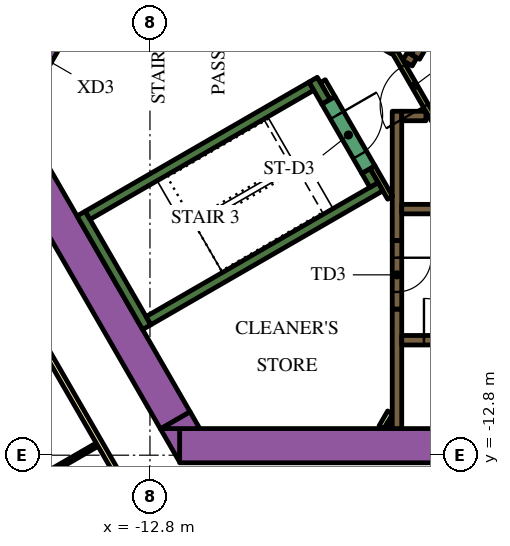
"""IFC4 building model, lengths in metres.
Left out: names, types, materials, properties, quantities, classifications, styles, units other than length and angle.
Written with IfcOpenShell. Run it as: python <this file> out.ifc"""

import sys

from ifc_helpers import new_model, si_unit, direction, frame, frame_2d, origin, place, context, subcontext, project, spatial, polyline, rectangle, outline, extrude, element, fill, save


model = new_model("IFC4")
c1 = context("Model", 3, precision=1e-05, world=origin(), true_north=direction((0.0, 1.0)))
c2 = subcontext(c1, "Body", "Model", "MODEL_VIEW")
j1 = project(units=[si_unit("LENGTHUNIT", "METRE"), si_unit("PLANEANGLEUNIT", "RADIAN")], contexts=[c1])
p1 = place(None, origin())
s1 = spatial("IfcSite", under=j1, at=p1, CompositionType="ELEMENT")
p2 = place(p1, origin())
s2 = spatial("IfcBuilding", under=s1, at=p2, CompositionType="ELEMENT")
p3 = place(p2, frame((0.0, 0.0, 118.8)))
s3 = spatial("IfcBuildingStorey", under=s2, at=p3, CompositionType="ELEMENT", Elevation=118.8)
p4 = place(p3, frame((-12.019, -12.55, 0.0), z_axis=(0.0, 0.0, 1.0), x_axis=(1.0, 0.0, 0.0)))
e1 = element("IfcWall", 1, at=p4, inside=s3, PredefinedType="SOLIDWALL", context=c2, shape_type="SweptSolid", body=[
    extrude(rectangle(XDim=22.083, YDim=0.9, at=frame_2d((11.042, 0.0))), origin(), (0.0, 0.0, 1.0), 3.9),
])
p5 = place(p3, origin())
e2 = element("IfcWall", 2, at=p5, inside=s3, PredefinedType="SOLIDWALL", context=c2, shape_type="SweptSolid", body=[
    extrude(outline(polyline([(-12.529, -12.1), (-12.021, -12.1), (-12.021, -12.98), (-12.529, -12.1)])), origin(), (0.0, 0.0, 1.0), 3.9),
])
p6 = place(p3, frame((-12.134, -11.883, 0.0), z_axis=(0.0, 0.0, 1.0), x_axis=(-0.500005339912, 0.866022320763, 0.0)))
e3 = element("IfcWall", 3, at=p6, inside=s3, PredefinedType="SOLIDWALL", context=c2, shape_type="SweptSolid", body=[
    extrude(rectangle(XDim=9.488, YDim=0.9, at=frame_2d((4.744, 0.0))), origin(), (0.0, 0.0, 1.0), 3.9),
])
e4 = element("IfcWall", 4, at=p5, inside=s3, PredefinedType="SOLIDWALL", context=c2, shape_type="SweptSolid", body=[
    extrude(outline(polyline([(-11.489, -12.1), (-12.505, -12.1), (-11.743, -11.66), (-11.489, -12.1)])), origin(), (0.0, 0.0, 1.0), 3.9),
])
p7 = place(p3, frame((-12.885, -9.431, 0.0), z_axis=(0.0, 0.0, 1.0), x_axis=(-0.500020560727, 0.866013532718, 0.0)))
e5 = element("IfcWall", 5, at=p7, inside=s3, PredefinedType="SOLIDWALL", context=c2, shape_type="SweptSolid", body=[
    extrude(rectangle(XDim=3.45, YDim=0.25, at=frame_2d((1.725, 0.0))), origin(), (0.0, 0.0, 1.0), 3.9),
])
p8 = place(p3, frame((-14.44, -6.49, 0.0), z_axis=(0.0, 0.0, 1.0), x_axis=(0.866022966069, 0.500004222222, 0.0)))
e6 = element("IfcWall", 6, at=p8, inside=s3, PredefinedType="SOLIDWALL", context=c2, shape_type="SweptSolid", body=[
    extrude(rectangle(XDim=6.8, YDim=0.25, at=frame_2d((3.4, 0.0))), origin(), (0.0, 0.0, 1.0), 3.9),
])
p9 = place(p3, frame((-8.168, -3.503, 0.0), z_axis=(0.0, 0.0, 1.0), x_axis=(-0.499952099219, 0.866053057547, 0.0)))
e7 = element("IfcWall", 7, at=p9, inside=s3, PredefinedType="SOLIDWALL", context=c2, shape_type="SweptSolid", body=[
    extrude(rectangle(XDim=0.675, YDim=0.25, at=frame_2d((0.337, 0.0))), origin(), (0.0, 0.0, 1.0), 3.9),
])
p10 = place(p3, frame((-12.84, -9.261, 0.0), z_axis=(0.0, 0.0, 1.0), x_axis=(0.866016039709, 0.500016218704, 0.0)))
e8 = element("IfcWall", 8, at=p10, inside=s3, PredefinedType="SOLIDWALL", context=c2, shape_type="SweptSolid", body=[
    extrude(rectangle(XDim=7.05, YDim=0.25, at=frame_2d((3.525, 0.0))), origin(), (0.0, 0.0, 1.0), 3.9),
])
p11 = place(p3, frame((-6.905, -5.69, 0.0), z_axis=(0.0, 0.0, 1.0), x_axis=(-0.500402024738, 0.865793170242, 0.0)))
e9 = element("IfcWall", 9, at=p11, inside=s3, PredefinedType="SOLIDWALL", context=c2, shape_type="SweptSolid", body=[
    extrude(rectangle(XDim=0.425, YDim=0.25, at=frame_2d((0.212, 0.0))), origin(), (0.0, 0.0, 1.0), 3.9),
])
p12 = place(p3, frame((-6.3, -12.1, 0.0), z_axis=(0.0, 0.0, 1.0), x_axis=(0.0, 1.0, 0.0)))
e10 = element("IfcWall", 10, at=p12, inside=s3, PredefinedType="SOLIDWALL", context=c2, shape_type="SweptSolid", body=[
    extrude(rectangle(XDim=3.146, YDim=0.25, at=frame_2d((1.573, 0.0))), origin(), (0.0, 0.0, 1.0), 3.9),
])
p13 = place(p3, frame((-6.3, -3.75, 0.0), z_axis=(0.0, 0.0, 1.0), x_axis=(0.0, -1.0, 0.0)))
e11 = element("IfcWall", 11, at=p13, inside=s3, PredefinedType="SOLIDWALL", context=c2, shape_type="SweptSolid", body=[
    extrude(rectangle(XDim=3.404, YDim=0.25, at=frame_2d((1.702, 0.0))), origin(), (0.0, 0.0, 1.0), 3.9),
])
p14 = place(p3, frame((-6.175, -3.875, 0.0), z_axis=(0.0, 0.0, 1.0), x_axis=(1.0, 0.0, 0.0)))
e12 = element("IfcWall", 12, at=p14, inside=s3, PredefinedType="SOLIDWALL", context=c2, shape_type="SweptSolid", body=[
    extrude(rectangle(XDim=0.637, YDim=0.25, at=frame_2d((0.318, 0.0))), origin(), (0.0, 0.0, 1.0), 3.9),
])
p15 = place(p3, frame((-6.088, -2.305, 0.0), z_axis=(0.0, 0.0, 1.0), x_axis=(0.866059450854, -0.499941024108, 0.0)))
e13 = element("IfcWall", 13, at=p15, inside=s3, PredefinedType="SOLIDWALL", context=c2, shape_type="SweptSolid", body=[
    extrude(rectangle(XDim=0.29, YDim=0.25, at=frame_2d((0.145, 0.0))), origin(), (0.0, 0.0, 1.0), 3.9),
])
p16 = place(p3, frame((-7.889, -1.265, 0.0), z_axis=(0.0, 0.0, 1.0), x_axis=(0.865986741702, -0.500066958712, 0.0)))
e14 = element("IfcWall", 14, at=p16, inside=s3, PredefinedType="SOLIDWALL", context=c2, shape_type="SweptSolid", body=[
    extrude(rectangle(XDim=1.738, YDim=0.25, at=frame_2d((0.869, 0.0))), origin(), (0.0, 0.0, 1.0), 3.9),
])
p17 = place(p3, frame((-6.708, -12.068, 0.0), z_axis=(0.0, 0.0, 1.0), x_axis=(0.500000789788, 0.8660249478, 0.0)))
e15 = element("IfcWall", 15, at=p17, inside=s3, PredefinedType="PARTITIONING", context=c2, shape_type="SweptSolid", body=[
    extrude(rectangle(XDim=0.456, YDim=0.15, at=frame_2d((0.228, 0.0))), origin(), (0.0, 0.0, 1.0), 2.75),
])
p18 = place(p3, frame((-6.534, -12.068, 0.0), z_axis=(0.0, 0.0, 1.0), x_axis=(0.500240224089, 0.865886665912, 0.0)))
e16 = element("IfcWall", 16, at=p18, inside=s3, PredefinedType="PARTITIONING", context=c2, shape_type="SweptSolid", body=[
    extrude(rectangle(XDim=0.109, YDim=0.15, at=frame_2d((0.054, 0.0))), origin(), (0.0, 0.0, 1.0), 2.75),
])
p19 = place(p3, frame((-6.48, -6.027, 0.0), z_axis=(0.0, 0.0, 1.0), x_axis=(-0.499927229454, 0.866067413802, 0.0)))
e17 = element("IfcWall", 17, at=p19, inside=s3, PredefinedType="PARTITIONING", context=c2, shape_type="SweptSolid", body=[
    extrude(rectangle(XDim=0.929, YDim=0.15, at=frame_2d((0.464, 0.0))), origin(), (0.0, 0.0, 1.0), 3.9),
])
p20 = place(p3, frame((-8.252, -2.958, 0.0), z_axis=(0.0, 0.0, 1.0), x_axis=(0.500174715838, -0.865924508047, 0.0)))
e18 = element("IfcWall", 18, at=p20, inside=s3, PredefinedType="PARTITIONING", context=c2, shape_type="SweptSolid", body=[
    extrude(rectangle(XDim=0.514, YDim=0.15, at=frame_2d((0.257, 0.0))), origin(), (0.0, 0.0, 1.0), 2.75),
])
p21 = place(p3, frame((-6.175, -9.775, 0.0), z_axis=(0.0, 0.0, 1.0), x_axis=(1.0, 0.0, 0.0)))
e19 = element("IfcWall", 19, at=p21, inside=s3, PredefinedType="SOLIDWALL", context=c2, shape_type="SweptSolid", body=[
    extrude(rectangle(XDim=12.35, YDim=0.25, at=frame_2d((6.175, 0.0))), origin(), (0.0, 0.0, 1.0), 3.9),
])
p22 = place(p21, frame((0.585, 0.0, 0.0)))
e20 = element("IfcOpeningElement", 20, at=p22, cuts=e19, PredefinedType="OPENING", context=c2, shape_type="SweptSolid", body=[
    extrude(rectangle(XDim=1.1, YDim=2.1, at=frame_2d((0.55, 1.05))), frame((0.0, 0.135, 0.0), z_axis=(0.0, -1.0, 0.0), x_axis=(1.0, 0.0, 0.0)), (0.0, 0.0, 1.0), 0.27),
])
p23 = place(p21, frame((3.105, 0.0, 0.0)))
e21 = element("IfcOpeningElement", 21, at=p23, cuts=e19, PredefinedType="OPENING", context=c2, shape_type="SweptSolid", body=[
    extrude(rectangle(XDim=1.1, YDim=2.1, at=frame_2d((0.55, 1.05))), frame((0.0, 0.135, 0.0), z_axis=(0.0, -1.0, 0.0), x_axis=(1.0, 0.0, 0.0)), (0.0, 0.0, 1.0), 0.27),
])
p24 = place(p21, frame((5.625, 0.0, 0.0)))
e22 = element("IfcOpeningElement", 22, at=p24, cuts=e19, PredefinedType="OPENING", context=c2, shape_type="SweptSolid", body=[
    extrude(rectangle(XDim=1.1, YDim=2.1, at=frame_2d((0.55, 1.05))), frame((0.0, 0.135, 0.0), z_axis=(0.0, -1.0, 0.0), x_axis=(1.0, 0.0, 0.0)), (0.0, 0.0, 1.0), 0.27),
])
p25 = place(p21, frame((8.145, 0.0, 0.0)))
e23 = element("IfcOpeningElement", 23, at=p25, cuts=e19, PredefinedType="OPENING", context=c2, shape_type="SweptSolid", body=[
    extrude(rectangle(XDim=1.1, YDim=2.1, at=frame_2d((0.55, 1.05))), frame((0.0, 0.135, 0.0), z_axis=(0.0, -1.0, 0.0), x_axis=(1.0, 0.0, 0.0)), (0.0, 0.0, 1.0), 0.27),
])
p26 = place(p21, frame((10.665, 0.0, 0.0)))
e24 = element("IfcOpeningElement", 24, at=p26, cuts=e19, PredefinedType="OPENING", context=c2, shape_type="SweptSolid", body=[
    extrude(rectangle(XDim=1.1, YDim=2.1, at=frame_2d((0.55, 1.05))), frame((0.0, 0.135, 0.0), z_axis=(0.0, -1.0, 0.0), x_axis=(1.0, 0.0, 0.0)), (0.0, 0.0, 1.0), 0.27),
])
p27 = place(p3, frame((-6.175, -6.325, 0.0), z_axis=(0.0, 0.0, 1.0), x_axis=(1.0, 0.0, 0.0)))
e25 = element("IfcWall", 25, at=p27, inside=s3, PredefinedType="SOLIDWALL", context=c2, shape_type="SweptSolid", body=[
    extrude(rectangle(XDim=12.35, YDim=0.25, at=frame_2d((6.175, 0.0))), origin(), (0.0, 0.0, 1.0), 3.9),
])
p28 = place(p27, frame((3.205, 0.0, 0.0)))
e26 = element("IfcOpeningElement", 26, at=p28, cuts=e25, PredefinedType="OPENING", context=c2, shape_type="SweptSolid", body=[
    extrude(rectangle(XDim=0.9, YDim=2.1, at=frame_2d((0.45, 1.05))), frame((0.0, 0.135, 0.0), z_axis=(0.0, -1.0, 0.0), x_axis=(1.0, 0.0, 0.0)), (0.0, 0.0, 1.0), 0.27),
])
p29 = place(p27, frame((8.145, 0.0, 0.0)))
e27 = element("IfcOpeningElement", 27, at=p29, cuts=e25, PredefinedType="OPENING", context=c2, shape_type="SweptSolid", body=[
    extrude(rectangle(XDim=1.1, YDim=2.1, at=frame_2d((0.55, 1.05))), frame((0.0, 0.135, 0.0), z_axis=(0.0, -1.0, 0.0), x_axis=(1.0, 0.0, 0.0)), (0.0, 0.0, 1.0), 0.27),
])
p30 = place(p27, frame((10.665, 0.0, 0.0)))
e28 = element("IfcOpeningElement", 28, at=p30, cuts=e25, PredefinedType="OPENING", context=c2, shape_type="SweptSolid", body=[
    extrude(rectangle(XDim=1.1, YDim=2.1, at=frame_2d((0.55, 1.05))), frame((0.0, 0.135, 0.0), z_axis=(0.0, -1.0, 0.0), x_axis=(1.0, 0.0, 0.0)), (0.0, 0.0, 1.0), 0.27),
])
p31 = place(p3, frame((-0.898, 6.194, 0.0), z_axis=(0.0, 0.0, 1.0), x_axis=(-0.499996202215, -0.866027596426, 0.0)))
e29 = element("IfcWall", 29, at=p31, inside=s3, PredefinedType="SOLIDWALL", context=c2, shape_type="SweptSolid", body=[
    extrude(rectangle(XDim=9.83, YDim=0.25, at=frame_2d((4.915, 0.0))), origin(), (0.0, 0.0, 1.0), 3.9),
])
p32 = place(p31, frame((0.585, 0.0, 0.0)))
e30 = element("IfcOpeningElement", 30, at=p32, cuts=e29, PredefinedType="OPENING", context=c2, shape_type="SweptSolid", body=[
    extrude(rectangle(XDim=1.1, YDim=2.1, at=frame_2d((0.55, 1.05))), frame((0.0, 0.135, 0.0), z_axis=(0.0, -1.0, 0.0), x_axis=(1.0, 0.0, 0.0)), (0.0, 0.0, 1.0), 0.27),
])
p33 = place(p31, frame((3.105, 0.0, 0.0)))
e31 = element("IfcOpeningElement", 31, at=p33, cuts=e29, PredefinedType="OPENING", context=c2, shape_type="SweptSolid", body=[
    extrude(rectangle(XDim=1.1, YDim=2.1, at=frame_2d((0.55, 1.05))), frame((0.0, 0.135, 0.0), z_axis=(0.0, -1.0, 0.0), x_axis=(1.0, 0.0, 0.0)), (0.0, 0.0, 1.0), 0.27),
])
p34 = place(p31, frame((5.625, 0.0, 0.0)))
e32 = element("IfcOpeningElement", 32, at=p34, cuts=e29, PredefinedType="OPENING", context=c2, shape_type="SweptSolid", body=[
    extrude(rectangle(XDim=1.1, YDim=2.1, at=frame_2d((0.55, 1.05))), frame((0.0, 0.135, 0.0), z_axis=(0.0, -1.0, 0.0), x_axis=(1.0, 0.0, 0.0)), (0.0, 0.0, 1.0), 0.27),
])
p35 = place(p31, frame((8.145, 0.0, 0.0)))
e33 = element("IfcOpeningElement", 33, at=p35, cuts=e29, PredefinedType="OPENING", context=c2, shape_type="SweptSolid", body=[
    extrude(rectangle(XDim=1.1, YDim=2.1, at=frame_2d((0.55, 1.05))), frame((0.0, 0.135, 0.0), z_axis=(0.0, -1.0, 0.0), x_axis=(1.0, 0.0, 0.0)), (0.0, 0.0, 1.0), 0.27),
])
p36 = place(p3, frame((-8.103, -3.466, 0.0), z_axis=(0.0, 0.0, 1.0), x_axis=(0.500078061341, -0.865980330357, 0.0)))
e34 = element("IfcWall", 34, at=p36, inside=s3, PredefinedType="SOLIDWALL", context=c2, shape_type="SweptSolid", body=[
    extrude(rectangle(XDim=2.1, YDim=0.4, at=frame_2d((1.05, 0.0))), origin(), (0.0, 0.0, 1.0), 3.9),
])
p37 = place(p36, frame((0.45, 0.0, 0.0)))
e35 = element("IfcOpeningElement", 35, at=p37, cuts=e34, PredefinedType="OPENING", context=c2, shape_type="SweptSolid", body=[
    extrude(rectangle(XDim=1.2, YDim=2.1, at=frame_2d((0.6, 1.05))), frame((0.0, 0.21, 0.0), z_axis=(0.0, -1.0, 0.0), x_axis=(1.0, 0.0, 0.0)), (0.0, 0.0, 1.0), 0.42),
])
p38 = place(p3, frame((-6.3, -7.154, 0.0), z_axis=(0.0, 0.0, 1.0), x_axis=(0.0, -1.0, 0.0)))
e36 = element("IfcWall", 36, at=p38, inside=s3, PredefinedType="SOLIDWALL", context=c2, shape_type="SweptSolid", body=[
    extrude(rectangle(XDim=1.8, YDim=0.25, at=frame_2d((0.9, 0.0))), origin(), (0.0, 0.0, 1.0), 3.9),
])
p39 = place(p38, frame((0.45, 0.0, 0.0)))
e37 = element("IfcOpeningElement", 37, at=p39, cuts=e36, PredefinedType="OPENING", context=c2, shape_type="SweptSolid", body=[
    extrude(rectangle(XDim=0.9, YDim=2.1, at=frame_2d((0.45, 1.05))), frame((0.0, 0.135, 0.0), z_axis=(0.0, -1.0, 0.0), x_axis=(1.0, 0.0, 0.0)), (0.0, 0.0, 1.0), 0.27),
])
p40 = place(p3, frame((-5.317, -3.99, 0.0), z_axis=(0.0, 0.0, 1.0), x_axis=(-0.500027713859, 0.866009402589, 0.0)))
e38 = element("IfcWall", 38, at=p40, inside=s3, PredefinedType="PARTITIONING", context=c2, shape_type="SweptSolid", body=[
    extrude(rectangle(XDim=2.1, YDim=0.15, at=frame_2d((1.05, 0.0))), origin(), (0.0, 0.0, 1.0), 3.9),
])
p41 = place(p40, frame((0.45, 0.0, 0.0)))
e39 = element("IfcOpeningElement", 39, at=p41, cuts=e38, PredefinedType="OPENING", context=c2, shape_type="SweptSolid", body=[
    extrude(rectangle(XDim=1.2, YDim=2.1, at=frame_2d((0.6, 1.05))), frame((0.0, 0.085, 0.0), z_axis=(0.0, -1.0, 0.0), x_axis=(1.0, 0.0, 0.0)), (0.0, 0.0, 1.0), 0.17),
])
p42 = place(p3, frame((-16.209, -2.976, 0.0), z_axis=(0.0, 0.0, 1.0), x_axis=(0.499954529098, 0.86605165483, 0.0)))
e40 = element("IfcWall", 40, at=p42, inside=s3, PredefinedType="SOLIDWALL", context=c2, shape_type="SweptSolid", body=[
    extrude(rectangle(XDim=1.7, YDim=0.9, at=frame_2d((0.85, 0.0))), origin(), (0.0, 0.0, 1.0), 3.9),
])
p43 = place(p42, frame((0.25, 0.0, 0.0)))
e41 = element("IfcOpeningElement", 41, at=p43, cuts=e40, PredefinedType="OPENING", context=c2, shape_type="SweptSolid", body=[
    extrude(rectangle(XDim=1.2, YDim=2.1, at=frame_2d((0.6, 1.05))), frame((0.0, 0.46, 0.0), z_axis=(0.0, -1.0, 0.0), x_axis=(1.0, 0.0, 0.0)), (0.0, 0.0, 1.0), 0.92),
])
p44 = place(p3, frame((-19.081, -3.9, 0.0), z_axis=(0.0, 0.0, 1.0), x_axis=(0.499998313975, 0.866026377209, 0.0)))
e42 = element("IfcWall", 42, at=p44, inside=s3, PredefinedType="PARTITIONING", context=c2, shape_type="SweptSolid", body=[
    extrude(rectangle(XDim=25.766, YDim=0.15, at=frame_2d((12.883, 0.0))), origin(), (0.0, 0.0, 1.0), 2.75),
])
p45 = place(p44, frame((19.306, 0.0, 0.0)))
e43 = element("IfcOpeningElement", 43, at=p45, cuts=e42, PredefinedType="OPENING", context=c2, shape_type="SweptSolid", body=[
    extrude(rectangle(XDim=1.0, YDim=2.1, at=frame_2d((0.5, 1.05))), frame((0.0, 0.085, 0.0), z_axis=(0.0, -1.0, 0.0), x_axis=(1.0, 0.0, 0.0)), (0.0, 0.0, 1.0), 0.17),
])
p46 = place(p44, frame((18.0, 0.0, 0.0)))
e44 = element("IfcOpeningElement", 44, at=p46, cuts=e42, PredefinedType="OPENING", context=c2, shape_type="SweptSolid", body=[
    extrude(rectangle(XDim=1.0, YDim=2.1, at=frame_2d((0.5, 1.05))), frame((0.0, 0.085, 0.0), z_axis=(0.0, -1.0, 0.0), x_axis=(1.0, 0.0, 0.0)), (0.0, 0.0, 1.0), 0.17),
])
p47 = place(p44, frame((7.793, 0.0, 0.0)))
e45 = element("IfcOpeningElement", 45, at=p47, cuts=e42, PredefinedType="OPENING", context=c2, shape_type="SweptSolid", body=[
    extrude(rectangle(XDim=0.9, YDim=2.1, at=frame_2d((0.45, 1.05))), frame((0.0, 0.085, 0.0), z_axis=(0.0, -1.0, 0.0), x_axis=(1.0, 0.0, 0.0)), (0.0, 0.0, 1.0), 0.17),
])
p48 = place(p44, frame((4.674, 0.0, 0.0)))
e46 = element("IfcOpeningElement", 46, at=p48, cuts=e42, PredefinedType="OPENING", context=c2, shape_type="SweptSolid", body=[
    extrude(rectangle(XDim=0.9, YDim=2.1, at=frame_2d((0.45, 1.05))), frame((0.0, 0.085, 0.0), z_axis=(0.0, -1.0, 0.0), x_axis=(1.0, 0.0, 0.0)), (0.0, 0.0, 1.0), 0.17),
])
p49 = place(p44, frame((0.18, 0.0, 0.0)))
e47 = element("IfcOpeningElement", 47, at=p49, cuts=e42, PredefinedType="OPENING", context=c2, shape_type="SweptSolid", body=[
    extrude(rectangle(XDim=1.0, YDim=2.1, at=frame_2d((0.5, 1.05))), frame((0.0, 0.085, 0.0), z_axis=(0.0, -1.0, 0.0), x_axis=(1.0, 0.0, 0.0)), (0.0, 0.0, 1.0), 0.17),
])
p50 = place(p3, frame((-12.918, -14.575, 0.0), z_axis=(0.0, 0.0, 1.0), x_axis=(-0.500009150678, 0.866020120573, 0.0)))
e48 = element("IfcWall", 48, at=p50, inside=s3, PredefinedType="PARTITIONING", context=c2, shape_type="SweptSolid", body=[
    extrude(rectangle(XDim=5.258, YDim=0.15, at=frame_2d((2.629, 0.0))), origin(), (0.0, 0.0, 1.0), 2.75),
])
p51 = place(p3, frame((-16.442, -13.823, 0.0), z_axis=(0.0, 0.0, 1.0), x_axis=(0.866021400173, 0.500006934395, 0.0)))
e49 = element("IfcWall", 49, at=p51, inside=s3, PredefinedType="PARTITIONING", context=c2, shape_type="SweptSolid", body=[
    extrude(rectangle(XDim=2.6, YDim=0.1, at=frame_2d((1.3, 0.0))), origin(), (0.0, 0.0, 1.0), 2.75),
])
p52 = place(p22, origin())
e50 = element("IfcDoor", 50, at=p52, inside=s3, OperationType="DOUBLE_DOOR_SLIDING", PredefinedType="DOOR", context=c2, shape_type="SweptSolid", body=[
    extrude(rectangle(XDim=1.1, YDim=2.1, at=frame_2d((0.55, 1.05))), frame((0.0, 0.025, 0.0), z_axis=(0.0, -1.0, 0.0), x_axis=(1.0, 0.0, 0.0)), (0.0, 0.0, 1.0), 0.05),
])
fill(e20, e50)
p53 = place(p37, origin())
e51 = element("IfcDoor", 51, at=p53, inside=s3, OperationType="SINGLE_SWING_LEFT", PredefinedType="DOOR", context=c2, shape_type="SweptSolid", body=[
    extrude(rectangle(XDim=1.2, YDim=2.1, at=frame_2d((0.6, 1.05))), frame((0.0, 0.025, 0.0), z_axis=(0.0, -1.0, 0.0), x_axis=(1.0, 0.0, 0.0)), (0.0, 0.0, 1.0), 0.05),
])
fill(e35, e51)
p54 = place(p39, origin())
e52 = element("IfcDoor", 52, at=p54, inside=s3, OperationType="SINGLE_SWING_LEFT", PredefinedType="DOOR", context=c2, shape_type="SweptSolid", body=[
    extrude(rectangle(XDim=0.9, YDim=2.1, at=frame_2d((0.45, 1.05))), frame((0.0, 0.025, 0.0), z_axis=(0.0, -1.0, 0.0), x_axis=(1.0, 0.0, 0.0)), (0.0, 0.0, 1.0), 0.05),
])
fill(e37, e52)
p55 = place(p41, origin())
e53 = element("IfcDoor", 53, at=p55, inside=s3, OperationType="SINGLE_SWING_LEFT", PredefinedType="DOOR", context=c2, shape_type="SweptSolid", body=[
    extrude(rectangle(XDim=1.2, YDim=2.1, at=frame_2d((0.6, 1.05))), frame((0.0, 0.025, 0.0), z_axis=(0.0, -1.0, 0.0), x_axis=(1.0, 0.0, 0.0)), (0.0, 0.0, 1.0), 0.05),
])
fill(e39, e53)
save(model, sys.argv[1])
